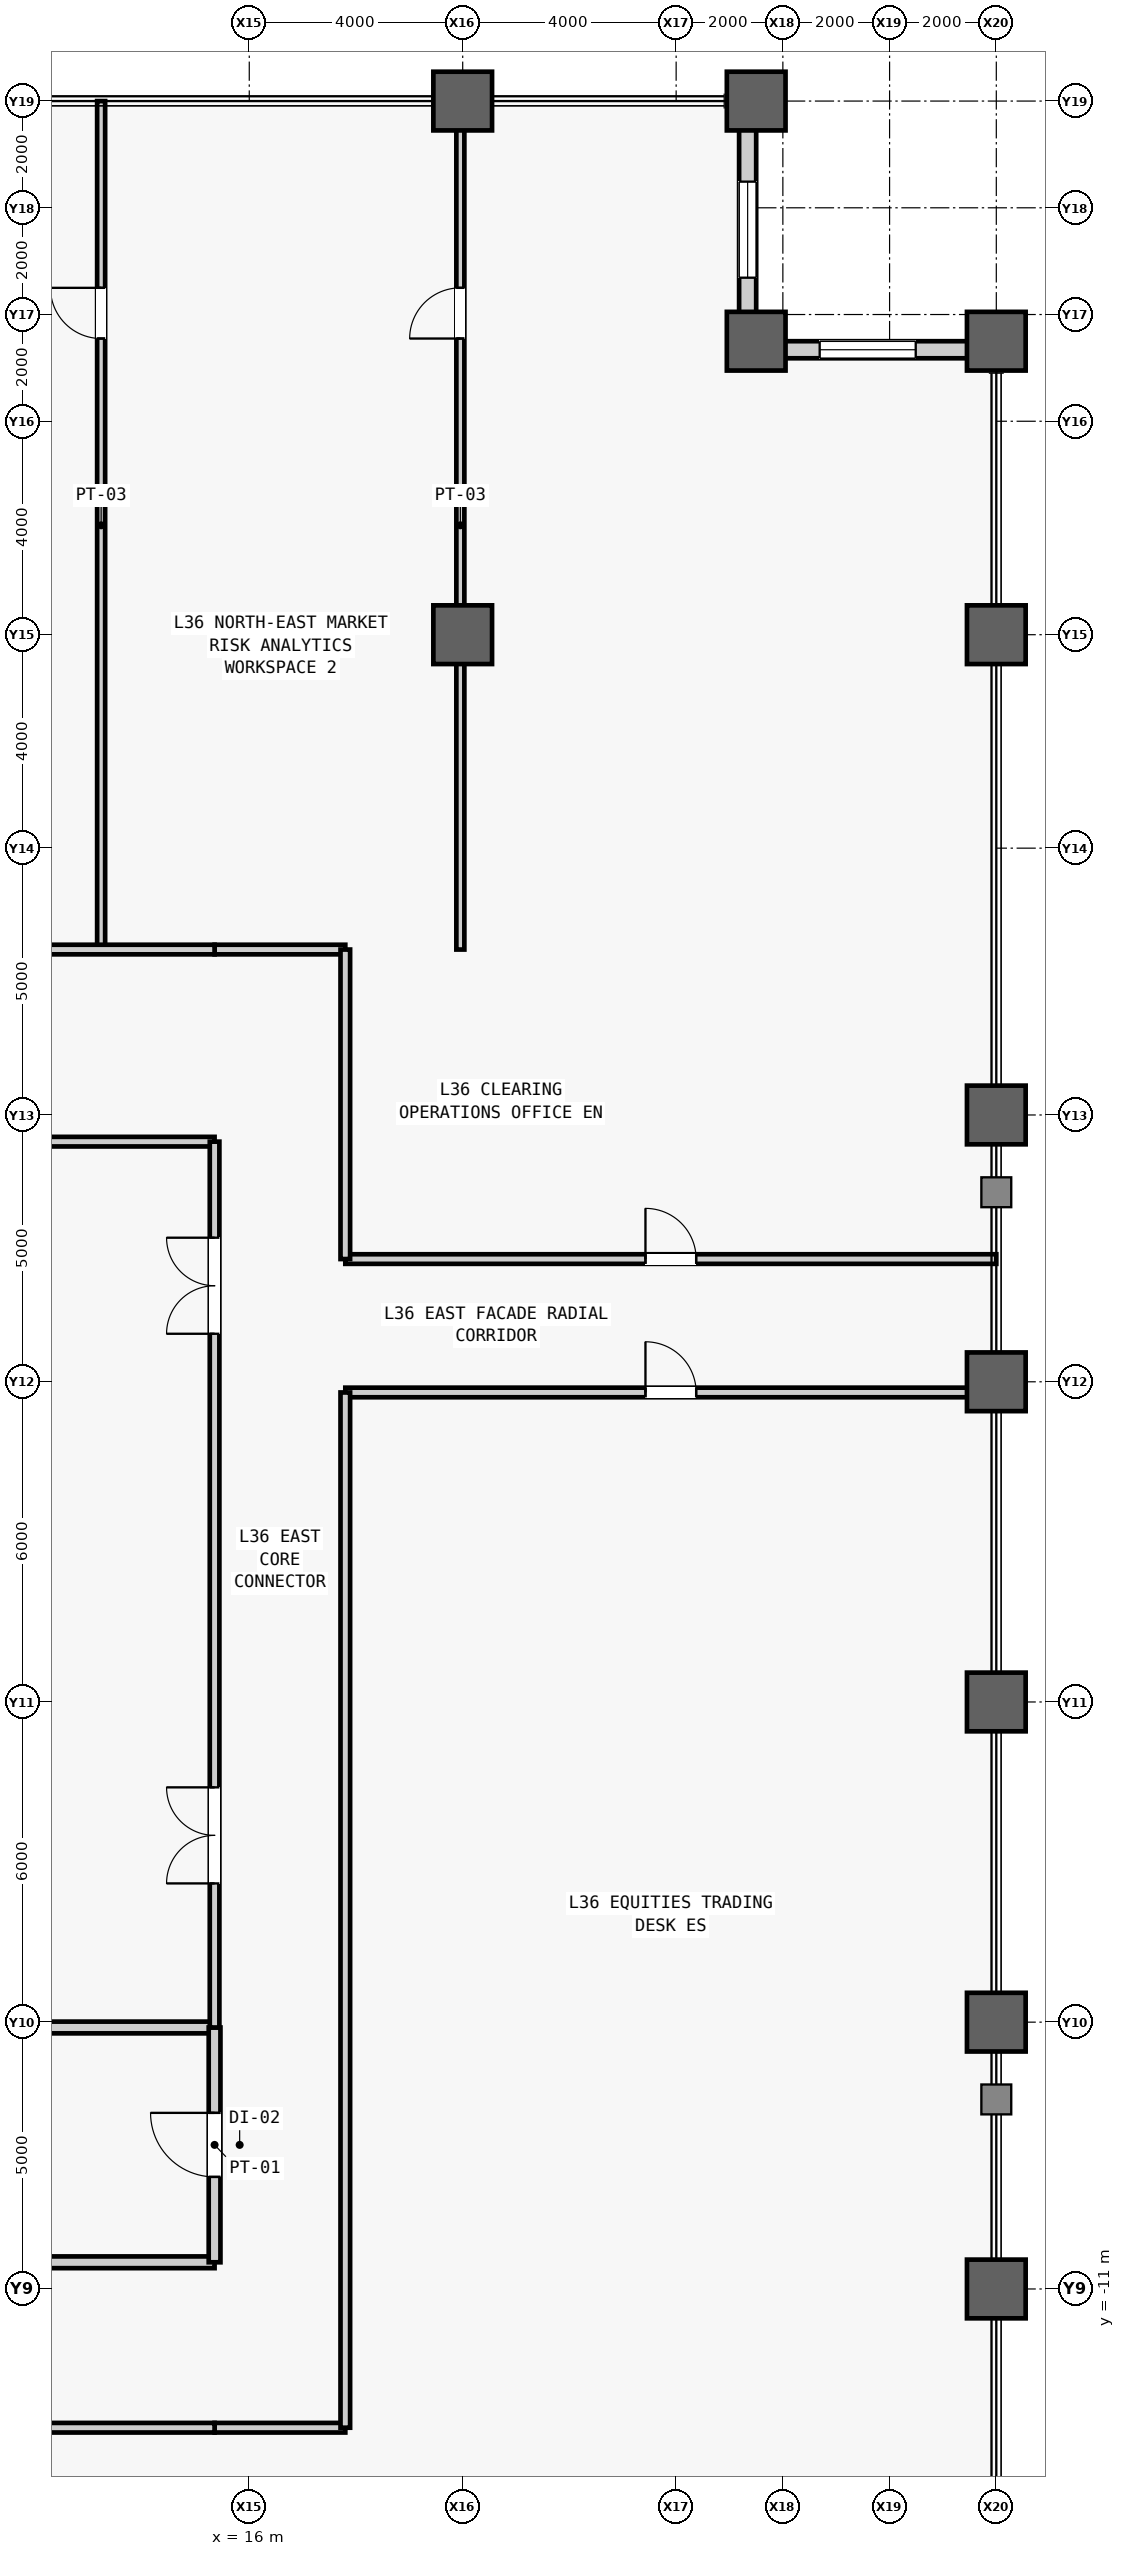
"""IFC4 building model, lengths in metres.
Left out: names, types, materials, properties, quantities, classifications, styles, units other than length and angle.
Written with IfcOpenShell. Run it as: python <this file> out.ifc"""

import sys

from ifc_helpers import new_model, si_unit, direction, frame, frame_2d, origin, origin_2d, place, context, subcontext, project, spatial, rectangle, hollow_rectangle, extrude, source, transform, mapped, element, fill, save


model = new_model("IFC4")
c1 = context("Model", 3, precision=1e-05, world=origin(), true_north=direction((0.0, 1.0)))
c2 = subcontext(c1, "Body", "Model", "MODEL_VIEW")
j1 = project(units=[si_unit("LENGTHUNIT", "METRE"), si_unit("PLANEANGLEUNIT", "RADIAN")], contexts=[c1])
p1 = place(None, origin())
s1 = spatial("IfcSite", under=j1, at=p1, CompositionType="ELEMENT")
p2 = place(p1, origin())
s2 = spatial("IfcBuilding", under=s1, at=p2, CompositionType="ELEMENT")
p3 = place(p2, frame((0.0, 0.0, 159.1)))
s3 = spatial("IfcBuildingStorey", under=s2, at=p3, CompositionType="ELEMENT", Elevation=159.1)
m1 = source(origin(), c2, "Body", "SweptSolid", [
    extrude(hollow_rectangle(XDim=1.1, YDim=1.1, WallThickness=0.06, at=origin_2d()), origin(), (0.0, 0.0, 1.0), 4.0),
])
for number, where, z_axis, x_axis in (
    (1, (20.0, 20.0, 0.0), (0.0, 0.0, 1.0), (1.0, 0.0, 0.0)),
    (2, (20.0, 30.0, 0.0), (0.0, 0.0, 1.0), (1.0, 0.0, 0.0)),
    (3, (25.5, 25.5, 0.0), (0.0, 0.0, 1.0), (1.0, 0.0, 0.0)),
    (4, (25.5, 30.0, 0.0), (0.0, 0.0, 1.0), (1.0, 0.0, 0.0)),
    (5, (30.0, -11.0, 0.0), (0.0, 0.0, 1.0), (1.0, 0.0, 0.0)),
    (6, (30.0, -6.0, 0.0), (0.0, 0.0, 1.0), (1.0, 0.0, 0.0)),
    (7, (30.0, 0.0, 0.0), (0.0, 0.0, 1.0), (1.0, 0.0, 0.0)),
    (8, (30.0, 6.0, 0.0), (0.0, 0.0, 1.0), (1.0, 0.0, 0.0)),
    (9, (30.0, 11.0, 0.0), (0.0, 0.0, 1.0), (1.0, 0.0, 0.0)),
    (10, (30.0, 20.0, 0.0), (0.0, 0.0, 1.0), (1.0, 0.0, 0.0)),
    (11, (30.0, 25.5, 0.0), (0.0, 0.0, 1.0), (1.0, 0.0, 0.0)),
):
    element("IfcColumn", number, at=place(p3, frame(where, z_axis=z_axis, x_axis=x_axis)), inside=s3, PredefinedType="COLUMN", context=c2, shape_type="MappedRepresentation", body=[
        mapped(m1, transform((0.0, 0.0, 0.0), scale=1.0)),
    ])
m2 = source(origin(), c2, "Body", "SweptSolid", [
    extrude(rectangle(XDim=4.18, YDim=0.32, at=frame_2d((2.09, 0.0))), origin(), (0.0, 0.0, 1.0), 3.164),
])
p4 = place(p3, frame((25.5, 25.34, 0.0), z_axis=(0.0, 0.0, 1.0), x_axis=(1.0, 0.0, 0.0)))
e12 = element("IfcWall", 12, at=p4, inside=s3, PredefinedType="STANDARD", context=c2, shape_type="MappedRepresentation", body=[
    mapped(m2, transform((0.0, 0.0, 0.0), scale=1.0)),
])
m3 = source(origin(), c2, "Body", "SweptSolid", [
    extrude(rectangle(XDim=1.8, YDim=2.4, at=frame_2d((0.9, 1.2))), frame((0.0, 0.17, 0.0), z_axis=(0.0, -1.0, 0.0), x_axis=(1.0, 0.0, 0.0)), (0.0, 0.0, 1.0), 0.34),
])
p5 = place(p4, frame((1.19, 0.0, 0.5)))
e13 = element("IfcOpeningElement", 13, at=p5, cuts=e12, PredefinedType="OPENING", context=c2, shape_type="MappedRepresentation", body=[
    mapped(m3, transform((0.0, 0.0, 0.0), scale=1.0)),
])
p6 = place(p3, frame((25.34, 25.5, 0.0), z_axis=(0.0, 0.0, 1.0), x_axis=(0.0, 1.0, 0.0)))
e14 = element("IfcWall", 14, at=p6, inside=s3, PredefinedType="STANDARD", context=c2, shape_type="MappedRepresentation", body=[
    mapped(m2, transform((0.0, 0.0, 0.0), scale=1.0)),
])
p7 = place(p6, frame((1.19, 0.0, 0.5)))
e15 = element("IfcOpeningElement", 15, at=p7, cuts=e14, PredefinedType="OPENING", context=c2, shape_type="MappedRepresentation", body=[
    mapped(m3, transform((0.0, 0.0, 0.0), scale=1.0)),
])
m4 = source(origin(), c2, "Body", "SweptSolid", [
    extrude(rectangle(XDim=4.05, YDim=0.22, at=frame_2d((2.025, 0.0))), origin(), (0.0, 0.0, 1.0), 3.78),
])
p8 = place(p3, frame((11.3, -10.5, 0.0), z_axis=(0.0, 0.0, 1.0), x_axis=(1.0, 0.0, 0.0)))
e16 = element("IfcWall", 16, at=p8, inside=s3, PredefinedType="PARTITIONING", context=c2, shape_type="MappedRepresentation", body=[
    mapped(m4, transform((0.0, 0.0, 0.0), scale=1.0)),
])
m5 = source(origin(), c2, "Body", "SweptSolid", [
    extrude(rectangle(XDim=4.05, YDim=0.22, at=frame_2d((2.025, 0.0))), origin(), (0.0, 0.0, 1.0), 3.007),
])
p9 = place(p3, frame((11.3, -6.1, 0.0), z_axis=(0.0, 0.0, 1.0), x_axis=(1.0, 0.0, 0.0)))
e17 = element("IfcWall", 17, at=p9, inside=s3, PredefinedType="PARTITIONING", context=c2, shape_type="MappedRepresentation", body=[
    mapped(m5, transform((0.0, 0.0, 0.0), scale=1.0)),
])
m6 = source(origin(), c2, "Body", "SweptSolid", [
    extrude(rectangle(XDim=4.4, YDim=0.22, at=frame_2d((2.2, 0.0))), origin(), (0.0, 0.0, 1.0), 3.78),
])
p10 = place(p3, frame((15.35, -10.5, 0.0), z_axis=(0.0, 0.0, 1.0), x_axis=(0.0, 1.0, 0.0)))
e18 = element("IfcWall", 18, at=p10, inside=s3, PredefinedType="PARTITIONING", context=c2, shape_type="MappedRepresentation", body=[
    mapped(m6, transform((0.0, 0.0, 0.0), scale=1.0)),
])
m7 = source(origin(), c2, "Body", "SweptSolid", [
    extrude(rectangle(XDim=1.2, YDim=2.2, at=frame_2d((0.6, 1.1))), frame((0.0, 0.12, 0.0), z_axis=(0.0, -1.0, 0.0), x_axis=(1.0, 0.0, 0.0)), (0.0, 0.0, 1.0), 0.24),
])
p11 = place(p10, frame((1.6, 0.0, 0.0)))
e19 = element("IfcOpeningElement", 19, at=p11, cuts=e18, PredefinedType="OPENING", context=c2, shape_type="MappedRepresentation", body=[
    mapped(m7, transform((0.0, 0.0, 0.0), scale=1.0)),
])
m8 = source(origin(), c2, "Body", "SweptSolid", [
    extrude(rectangle(XDim=4.05, YDim=0.18, at=frame_2d((2.025, 0.0))), origin(), (0.0, 0.0, 1.0), 3.78),
])
p12 = place(p3, frame((11.3, 10.5, 0.0), z_axis=(0.0, 0.0, 1.0), x_axis=(1.0, 0.0, 0.0)))
e20 = element("IfcWall", 20, at=p12, inside=s3, PredefinedType="PARTITIONING", context=c2, shape_type="MappedRepresentation", body=[
    mapped(m8, transform((0.0, 0.0, 0.0), scale=1.0)),
])
m9 = source(origin(), c2, "Body", "SweptSolid", [
    extrude(rectangle(XDim=16.6, YDim=0.18, at=frame_2d((8.3, 0.0))), origin(), (0.0, 0.0, 1.0), 3.78),
])
p13 = place(p3, frame((15.35, -6.1, 0.0), z_axis=(0.0, 0.0, 1.0), x_axis=(0.0, 1.0, 0.0)))
e21 = element("IfcWall", 21, at=p13, inside=s3, PredefinedType="PARTITIONING", context=c2, shape_type="MappedRepresentation", body=[
    mapped(m9, transform((0.0, 0.0, 0.0), scale=1.0)),
])
m10 = source(origin(), c2, "Body", "SweptSolid", [
    extrude(rectangle(XDim=1.8, YDim=2.25, at=frame_2d((0.9, 1.125))), frame((0.0, 0.1, 0.0), z_axis=(0.0, -1.0, 0.0), x_axis=(1.0, 0.0, 0.0)), (0.0, 0.0, 1.0), 0.2),
])
p14 = place(p13, frame((2.7, 0.0, 0.0)))
e22 = element("IfcOpeningElement", 22, at=p14, cuts=e21, PredefinedType="OPENING", context=c2, shape_type="MappedRepresentation", body=[
    mapped(m10, transform((0.0, 0.0, 0.0), scale=1.0)),
])
p15 = place(p13, frame((13.0, 0.0, 0.0)))
e23 = element("IfcOpeningElement", 23, at=p15, cuts=e21, PredefinedType="OPENING", context=c2, shape_type="MappedRepresentation", body=[
    mapped(m10, transform((0.0, 0.0, 0.0), scale=1.0)),
])
m11 = source(origin(), c2, "Body", "SweptSolid", [
    extrude(rectangle(XDim=2.45, YDim=0.18, at=frame_2d((1.225, 0.0))), origin(), (0.0, 0.0, 1.0), 3.78),
])
for number, where, z_axis, x_axis in (
    (24, (15.35, -13.6, 0.0), (0.0, 0.0, 1.0), (1.0, 0.0, 0.0)),
    (25, (15.35, 14.1, 0.0), (0.0, 0.0, 1.0), (1.0, 0.0, 0.0)),
):
    element("IfcWall", number, at=place(p3, frame(where, z_axis=z_axis, x_axis=x_axis)), inside=s3, PredefinedType="PARTITIONING", context=c2, shape_type="MappedRepresentation", body=[
        mapped(m11, transform((0.0, 0.0, 0.0), scale=1.0)),
    ])
m12 = source(origin(), c2, "Body", "SweptSolid", [
    extrude(rectangle(XDim=18.65, YDim=0.18, at=frame_2d((9.325, 0.0))), origin(), (0.0, 0.0, 1.0), 3.78),
])
p16 = place(p3, frame((-3.3, -13.6, 0.0), z_axis=(0.0, 0.0, 1.0), x_axis=(1.0, 0.0, 0.0)))
e26 = element("IfcWall", 26, at=p16, inside=s3, PredefinedType="PARTITIONING", context=c2, shape_type="MappedRepresentation", body=[
    mapped(m12, transform((0.0, 0.0, 0.0), scale=1.0)),
])
m13 = source(origin(), c2, "Body", "SweptSolid", [
    extrude(rectangle(XDim=15.9, YDim=0.15, at=frame_2d((7.95, 0.0))), origin(), (0.0, 0.0, 1.0), 3.78),
])
p17 = place(p3, frame((13.224, 14.1, 0.0), z_axis=(0.0, 0.0, 1.0), x_axis=(0.0, 1.0, 0.0)))
e27 = element("IfcWall", 27, at=p17, inside=s3, PredefinedType="PARTITIONING", context=c2, shape_type="MappedRepresentation", body=[
    mapped(m13, transform((0.0, 0.0, 0.0), scale=1.0)),
])
m14 = source(origin(), c2, "Body", "SweptSolid", [
    extrude(rectangle(XDim=0.95, YDim=2.15, at=frame_2d((0.475, 1.075))), frame((0.0, 0.085, 0.0), z_axis=(0.0, -1.0, 0.0), x_axis=(1.0, 0.0, 0.0)), (0.0, 0.0, 1.0), 0.17),
])
p18 = place(p17, frame((11.45, 0.0, 0.0)))
e28 = element("IfcOpeningElement", 28, at=p18, cuts=e27, PredefinedType="OPENING", context=c2, shape_type="MappedRepresentation", body=[
    mapped(m14, transform((0.0, 0.0, 0.0), scale=1.0)),
])
m15 = source(origin(), c2, "Body", "SweptSolid", [
    extrude(rectangle(XDim=15.9, YDim=0.15, at=frame_2d((7.95, 0.0))), origin(), (0.0, 0.0, 1.0), 3.164),
])
p19 = place(p3, frame((19.956, 14.1, 0.0), z_axis=(0.0, 0.0, 1.0), x_axis=(0.0, 1.0, 0.0)))
e29 = element("IfcWall", 29, at=p19, inside=s3, PredefinedType="PARTITIONING", context=c2, shape_type="MappedRepresentation", body=[
    mapped(m15, transform((0.0, 0.0, 0.0), scale=1.0)),
])
p20 = place(p19, frame((11.45, 0.0, 0.0)))
e30 = element("IfcOpeningElement", 30, at=p20, cuts=e29, PredefinedType="OPENING", context=c2, shape_type="MappedRepresentation", body=[
    mapped(m14, transform((0.0, 0.0, 0.0), scale=1.0)),
])
m16 = source(origin(), c2, "Body", "SweptSolid", [
    extrude(rectangle(XDim=9.65, YDim=0.18, at=frame_2d((4.825, 0.0))), origin(), (0.0, 0.0, 1.0), 3.78),
])
p21 = place(p3, frame((5.7, 14.1, 0.0), z_axis=(0.0, 0.0, 1.0), x_axis=(1.0, 0.0, 0.0)))
e31 = element("IfcWall", 31, at=p21, inside=s3, PredefinedType="PARTITIONING", context=c2, shape_type="MappedRepresentation", body=[
    mapped(m16, transform((0.0, 0.0, 0.0), scale=1.0)),
])
m17 = source(origin(), c2, "Body", "SweptSolid", [
    extrude(rectangle(XDim=12.2, YDim=0.18, at=frame_2d((6.1, 0.0))), origin(), (0.0, 0.0, 1.0), 3.007),
])
p22 = place(p3, frame((17.8, 5.8, 0.0), z_axis=(0.0, 0.0, 1.0), x_axis=(1.0, 0.0, 0.0)))
e32 = element("IfcWall", 32, at=p22, inside=s3, PredefinedType="PARTITIONING", context=c2, shape_type="MappedRepresentation", body=[
    mapped(m17, transform((0.0, 0.0, 0.0), scale=1.0)),
])
m18 = source(origin(), c2, "Body", "SweptSolid", [
    extrude(rectangle(XDim=0.95, YDim=2.15, at=frame_2d((0.475, 1.075))), frame((0.0, 0.1, 0.0), z_axis=(0.0, -1.0, 0.0), x_axis=(1.0, 0.0, 0.0)), (0.0, 0.0, 1.0), 0.2),
])
p23 = place(p22, frame((5.625, 0.0, 0.0)))
e33 = element("IfcOpeningElement", 33, at=p23, cuts=e32, PredefinedType="OPENING", context=c2, shape_type="MappedRepresentation", body=[
    mapped(m18, transform((0.0, 0.0, 0.0), scale=1.0)),
])
m19 = source(origin(), c2, "Body", "SweptSolid", [
    extrude(rectangle(XDim=19.4, YDim=0.18, at=frame_2d((9.7, 0.0))), origin(), (0.0, 0.0, 1.0), 3.78),
])
p24 = place(p3, frame((17.8, -13.6, 0.0), z_axis=(0.0, 0.0, 1.0), x_axis=(0.0, 1.0, 0.0)))
e34 = element("IfcWall", 34, at=p24, inside=s3, PredefinedType="PARTITIONING", context=c2, shape_type="MappedRepresentation", body=[
    mapped(m19, transform((0.0, 0.0, 0.0), scale=1.0)),
])
m20 = source(origin(), c2, "Body", "SweptSolid", [
    extrude(rectangle(XDim=12.2, YDim=0.18, at=frame_2d((6.1, 0.0))), origin(), (0.0, 0.0, 1.0), 3.78),
])
p25 = place(p3, frame((17.8, 8.3, 0.0), z_axis=(0.0, 0.0, 1.0), x_axis=(1.0, 0.0, 0.0)))
e35 = element("IfcWall", 35, at=p25, inside=s3, PredefinedType="PARTITIONING", context=c2, shape_type="MappedRepresentation", body=[
    mapped(m20, transform((0.0, 0.0, 0.0), scale=1.0)),
])
p26 = place(p25, frame((5.625, 0.0, 0.0)))
e36 = element("IfcOpeningElement", 36, at=p26, cuts=e35, PredefinedType="OPENING", context=c2, shape_type="MappedRepresentation", body=[
    mapped(m18, transform((0.0, 0.0, 0.0), scale=1.0)),
])
m21 = source(origin(), c2, "Body", "SweptSolid", [
    extrude(rectangle(XDim=5.8, YDim=0.18, at=frame_2d((2.9, 0.0))), origin(), (0.0, 0.0, 1.0), 3.78),
])
p27 = place(p3, frame((17.8, 8.3, 0.0), z_axis=(0.0, 0.0, 1.0), x_axis=(0.0, 1.0, 0.0)))
e37 = element("IfcWall", 37, at=p27, inside=s3, PredefinedType="PARTITIONING", context=c2, shape_type="MappedRepresentation", body=[
    mapped(m21, transform((0.0, 0.0, 0.0), scale=1.0)),
])
m22 = source(origin(), c2, "Body", "SweptSolid", [
    extrude(rectangle(XDim=1.8, YDim=2.4, at=frame_2d((0.9, 1.2))), frame((0.0, 0.03, 0.0), z_axis=(0.0, -1.0, 0.0), x_axis=(1.0, 0.0, 0.0)), (0.0, 0.0, 1.0), 0.06),
])
p28 = place(p5, origin())
e38 = element("IfcWindow", 38, at=p28, inside=s3, PartitioningType="SINGLE_PANEL", PredefinedType="WINDOW", context=c2, shape_type="MappedRepresentation", body=[
    mapped(m22, transform((0.0, 0.0, 0.0), scale=1.0)),
])
fill(e13, e38)
p29 = place(p7, origin())
e39 = element("IfcWindow", 39, at=p29, inside=s3, PartitioningType="SINGLE_PANEL", PredefinedType="WINDOW", context=c2, shape_type="MappedRepresentation", body=[
    mapped(m22, transform((0.0, 0.0, 0.0), scale=1.0)),
])
fill(e15, e39)
m23 = source(origin(), c2, "Body", "SweptSolid", [
    extrude(rectangle(XDim=1.2, YDim=2.2, at=frame_2d((0.6, 1.1))), frame((0.0, 0.025, 0.0), z_axis=(0.0, -1.0, 0.0), x_axis=(1.0, 0.0, 0.0)), (0.0, 0.0, 1.0), 0.05),
])
p30 = place(p11, origin())
e40 = element("IfcDoor", 40, at=p30, inside=s3, OperationType="SINGLE_SWING_RIGHT", PredefinedType="DOOR", context=c2, shape_type="MappedRepresentation", body=[
    mapped(m23, transform((0.0, 0.0, 0.0), scale=1.0)),
])
fill(e19, e40)
m24 = source(origin(), c2, "Body", "SweptSolid", [
    extrude(rectangle(XDim=1.8, YDim=2.25, at=frame_2d((0.9, 1.125))), frame((0.0, 0.025, 0.0), z_axis=(0.0, -1.0, 0.0), x_axis=(1.0, 0.0, 0.0)), (0.0, 0.0, 1.0), 0.05),
])
p31 = place(p14, origin())
e41 = element("IfcDoor", 41, at=p31, inside=s3, OperationType="SINGLE_SWING_RIGHT", PredefinedType="DOOR", context=c2, shape_type="MappedRepresentation", body=[
    mapped(m24, transform((0.0, 0.0, 0.0), scale=1.0)),
])
fill(e22, e41)
p32 = place(p15, origin())
e42 = element("IfcDoor", 42, at=p32, inside=s3, OperationType="SINGLE_SWING_LEFT", PredefinedType="DOOR", context=c2, shape_type="MappedRepresentation", body=[
    mapped(m24, transform((0.0, 0.0, 0.0), scale=1.0)),
])
fill(e23, e42)
m25 = source(origin(), c2, "Body", "SweptSolid", [
    extrude(rectangle(XDim=0.95, YDim=2.15, at=frame_2d((0.475, 1.075))), frame((0.0, 0.025, 0.0), z_axis=(0.0, -1.0, 0.0), x_axis=(1.0, 0.0, 0.0)), (0.0, 0.0, 1.0), 0.05),
])
p33 = place(p18, origin())
e43 = element("IfcDoor", 43, at=p33, inside=s3, OperationType="SINGLE_SWING_RIGHT", PredefinedType="DOOR", context=c2, shape_type="MappedRepresentation", body=[
    mapped(m25, transform((0.0, 0.0, 0.0), scale=1.0)),
])
fill(e28, e43)
p34 = place(p20, origin())
e44 = element("IfcDoor", 44, at=p34, inside=s3, OperationType="SINGLE_SWING_LEFT", PredefinedType="DOOR", context=c2, shape_type="MappedRepresentation", body=[
    mapped(m25, transform((0.0, 0.0, 0.0), scale=1.0)),
])
fill(e30, e44)
p35 = place(p23, origin())
e45 = element("IfcDoor", 45, at=p35, inside=s3, OperationType="SINGLE_SWING_LEFT", PredefinedType="DOOR", context=c2, shape_type="MappedRepresentation", body=[
    mapped(m25, transform((0.0, 0.0, 0.0), scale=1.0)),
])
fill(e33, e45)
p36 = place(p26, origin())
e46 = element("IfcDoor", 46, at=p36, inside=s3, OperationType="SINGLE_SWING_LEFT", PredefinedType="DOOR", context=c2, shape_type="MappedRepresentation", body=[
    mapped(m25, transform((0.0, 0.0, 0.0), scale=1.0)),
])
fill(e36, e46)
save(model, sys.argv[1])
